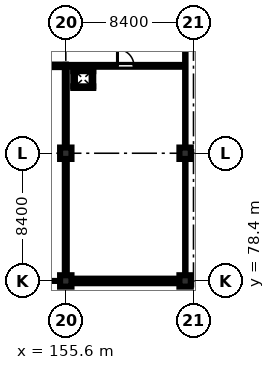
"""IFC4 building model, lengths in metres.
Left out: names, types, materials, properties, quantities, classifications, styles, units other than length and angle.
Written with IfcOpenShell. Run it as: python <this file> out.ifc"""

import sys

from ifc_helpers import new_model, si_unit, direction, frame, frame_2d, origin, origin_2d, place, context, subcontext, project, spatial, rectangle, extrude, element, fill, save


model = new_model("IFC4")
c1 = context("Model", 3, precision=1e-05, world=origin(), true_north=direction((0.0, 1.0)))
c2 = subcontext(c1, "Body", "Model", "MODEL_VIEW")
j1 = project(units=[si_unit("LENGTHUNIT", "METRE"), si_unit("PLANEANGLEUNIT", "RADIAN")], contexts=[c1])
p1 = place(None, origin())
s1 = spatial("IfcSite", under=j1, at=p1, CompositionType="ELEMENT")
p2 = place(p1, origin())
s2 = spatial("IfcBuilding", under=s1, at=p2, CompositionType="ELEMENT")
p3 = place(p2, frame((0.0, 0.0, 48.6)))
s3 = spatial("IfcBuildingStorey", under=s2, at=p3, CompositionType="ELEMENT", Elevation=48.6)
for number, where, z_axis, x_axis in (
    (1, (155.6, 78.4, 0.0), (0.0, 0.0, 1.0), (1.0, 0.0, 0.0)),
    (2, (155.6, 86.8, 0.0), (0.0, 0.0, 1.0), (1.0, 0.0, 0.0)),
    (3, (163.45, 78.4, 0.0), (0.0, 0.0, 1.0), (1.0, 0.0, 0.0)),
    (4, (163.45, 86.8, 0.0), (0.0, 0.0, 1.0), (1.0, 0.0, 0.0)),
):
    element("IfcColumn", number, at=place(p3, frame(where, z_axis=z_axis, x_axis=x_axis)), inside=s3, PredefinedType="COLUMN", context=c2, shape_type="SweptSolid", body=[
        extrude(rectangle(XDim=0.75, YDim=0.75, at=origin_2d()), origin(), (0.0, 0.0, 1.0), 4.03),
    ])
p4 = place(p3, frame((163.075, 78.4, 0.0), z_axis=(0.0, 0.0, 1.0), x_axis=(-1.0, 0.0, 0.0)))
e5 = element("IfcWall", 5, at=p4, inside=s3, PredefinedType="STANDARD", context=c2, shape_type="SweptSolid", body=[
    extrude(rectangle(XDim=7.1, YDim=0.3, at=frame_2d((3.55, 0.0))), origin(), (0.0, 0.0, 1.0), 3.33),
])
p5 = place(p4, frame((1.15, 0.0, 0.95)))
e6 = element("IfcOpeningElement", 6, at=p5, cuts=e5, PredefinedType="OPENING", context=c2, shape_type="SweptSolid", body=[
    extrude(rectangle(XDim=2.2, YDim=2.0, at=frame_2d((1.1, 1.0))), frame((0.0, 0.16, 0.0), z_axis=(0.0, -1.0, 0.0), x_axis=(1.0, 0.0, 0.0)), (0.0, 0.0, 1.0), 0.32),
])
p6 = place(p3, frame((138.95, 92.55, 0.0), z_axis=(0.0, 0.0, 1.0), x_axis=(1.0, 0.0, 0.0)))
e7 = element("IfcWall", 7, at=p6, inside=s3, PredefinedType="PARTITIONING", context=c2, shape_type="SweptSolid", body=[
    extrude(rectangle(XDim=16.65, YDim=0.165, at=frame_2d((8.325, 0.0))), origin(), (0.0, 0.0, 1.0), 4.03),
])
p7 = place(p6, frame((3.65, 0.0, 0.0)))
e8 = element("IfcOpeningElement", 8, at=p7, cuts=e7, PredefinedType="OPENING", context=c2, shape_type="SweptSolid", body=[
    extrude(rectangle(XDim=1.64, YDim=2.24, at=frame_2d((0.82, 1.12))), frame((0.0, 0.093, 0.0), z_axis=(0.0, -1.0, 0.0), x_axis=(1.0, 0.0, 0.0)), (0.0, 0.0, 1.0), 0.185),
])
p8 = place(p3, frame((155.6, 92.55, 0.0), z_axis=(0.0, 0.0, 1.0), x_axis=(1.0, 0.0, 0.0)))
e9 = element("IfcWall", 9, at=p8, inside=s3, PredefinedType="PARTITIONING", context=c2, shape_type="SweptSolid", body=[
    extrude(rectangle(XDim=7.75, YDim=0.12, at=frame_2d((3.875, 0.0))), origin(), (0.0, 0.0, 1.0), 4.03),
])
p9 = place(p8, frame((3.4, 0.0, 0.0)))
e10 = element("IfcOpeningElement", 10, at=p9, cuts=e9, PredefinedType="OPENING", context=c2, shape_type="SweptSolid", body=[
    extrude(rectangle(XDim=1.08, YDim=2.15, at=frame_2d((0.54, 1.075))), frame((0.0, 0.07, 0.0), z_axis=(0.0, -1.0, 0.0), x_axis=(1.0, 0.0, 0.0)), (0.0, 0.0, 1.0), 0.14),
])
p10 = place(p3, frame((155.6, 78.55, 0.0), z_axis=(0.0, 0.0, 1.0), x_axis=(0.0, 1.0, 0.0)))
e11 = element("IfcWall", 11, at=p10, inside=s3, PredefinedType="PARTITIONING", context=c2, shape_type="SweptSolid", body=[
    extrude(rectangle(XDim=14.0, YDim=0.128, at=frame_2d((7.0, 0.0))), origin(), (0.0, 0.0, 1.0), 3.33),
])
for number, where, z_axis, x_axis in (
    (12, (156.095, 91.147, 0.0), (0.0, 0.0, 1.0), (1.0, 0.0, 0.0)),
    (13, (156.095, 92.252, 0.0), (0.0, 0.0, 1.0), (1.0, 0.0, 0.0)),
):
    element("IfcWall", number, at=place(p3, frame(where, z_axis=z_axis, x_axis=x_axis)), inside=s3, PredefinedType="PARTITIONING", context=c2, shape_type="SweptSolid", body=[
        extrude(rectangle(XDim=1.31, YDim=0.105, at=frame_2d((0.655, 0.0))), origin(), (0.0, 0.0, 1.0), 4.03),
    ])
for number, where, z_axis, x_axis in (
    (14, (156.147, 91.2, 0.0), (0.0, 0.0, 1.0), (0.0, 1.0, 0.0)),
    (15, (157.353, 91.2, 0.0), (0.0, 0.0, 1.0), (0.0, 1.0, 0.0)),
):
    element("IfcWall", number, at=place(p3, frame(where, z_axis=z_axis, x_axis=x_axis)), inside=s3, PredefinedType="PARTITIONING", context=c2, shape_type="SweptSolid", body=[
        extrude(rectangle(XDim=1.0, YDim=0.105, at=frame_2d((0.5, 0.0))), origin(), (0.0, 0.0, 1.0), 4.03),
    ])
p11 = place(p5, origin())
e16 = element("IfcWindow", 16, at=p11, inside=s3, PartitioningType="DOUBLE_PANEL_VERTICAL", PredefinedType="WINDOW", context=c2, shape_type="SweptSolid", body=[
    extrude(rectangle(XDim=2.2, YDim=2.0, at=frame_2d((1.1, 1.0))), frame((0.0, 0.03, 0.0), z_axis=(0.0, -1.0, 0.0), x_axis=(1.0, 0.0, 0.0)), (0.0, 0.0, 1.0), 0.06),
])
fill(e6, e16)
p12 = place(p9, origin())
e17 = element("IfcDoor", 17, at=p12, inside=s3, OperationType="SINGLE_SWING_LEFT", PredefinedType="DOOR", context=c2, shape_type="SweptSolid", body=[
    extrude(rectangle(XDim=1.08, YDim=2.15, at=frame_2d((0.54, 1.075))), frame((0.0, 0.025, 0.0), z_axis=(0.0, -1.0, 0.0), x_axis=(1.0, 0.0, 0.0)), (0.0, 0.0, 1.0), 0.05),
])
fill(e10, e17)
save(model, sys.argv[1])
